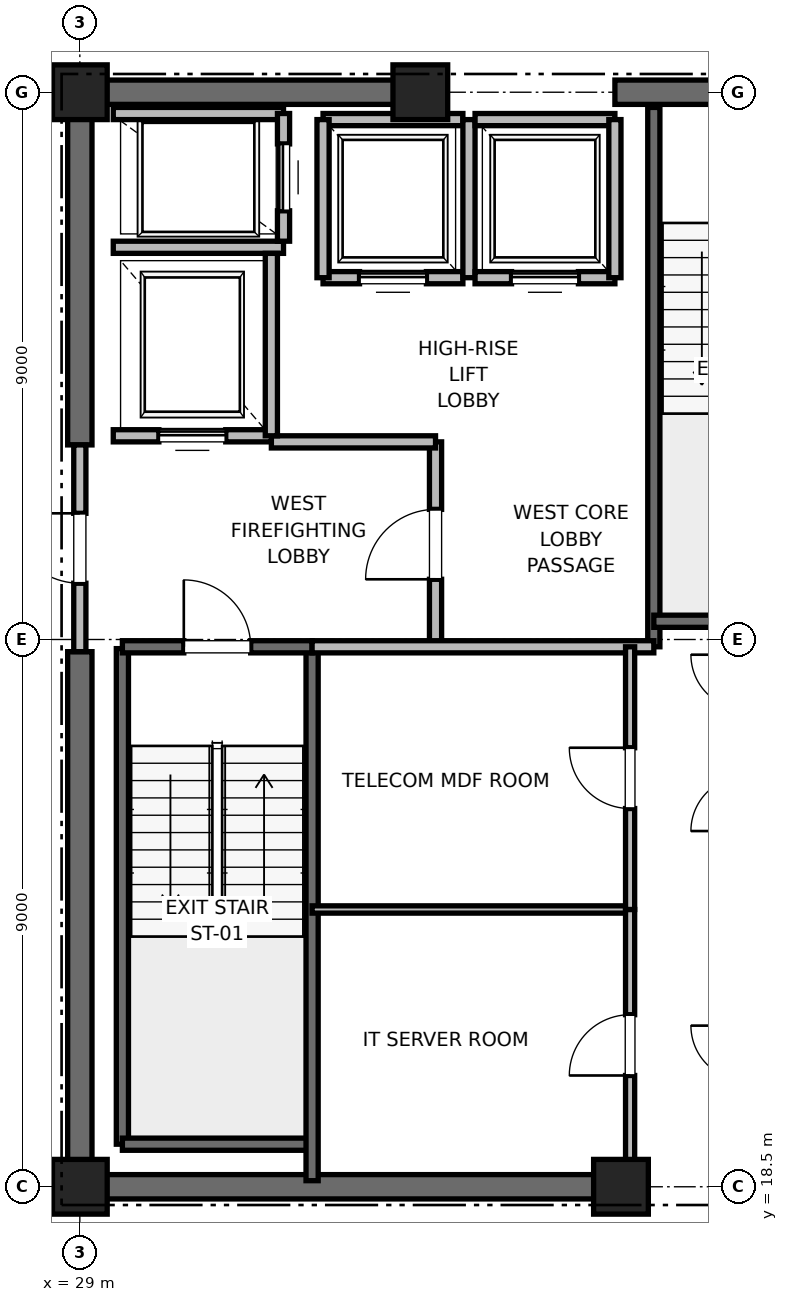
"""IFC4 building model, lengths in metres.
Left out: names, types, materials, properties, quantities, classifications, styles, units other than length and angle.
Written with IfcOpenShell. Run it as: python <this file> out.ifc"""

import sys

from ifc_helpers import new_model, si_unit, direction, frame, frame_2d, origin, origin_2d, place, context, subcontext, project, spatial, rectangle, extrude, element, fill, save


model = new_model("IFC4")
c1 = context("Model", 3, precision=1e-05, world=origin(), true_north=direction((0.0, 1.0)))
c2 = subcontext(c1, "Body", "Model", "MODEL_VIEW")
j1 = project(units=[si_unit("LENGTHUNIT", "METRE"), si_unit("PLANEANGLEUNIT", "RADIAN")], contexts=[c1])
p1 = place(None, origin())
s1 = spatial("IfcSite", under=j1, at=p1, CompositionType="ELEMENT")
p2 = place(p1, origin())
s2 = spatial("IfcBuilding", under=s1, at=p2, CompositionType="ELEMENT")
p3 = place(p2, frame((0.0, 0.0, 326.8)))
s3 = spatial("IfcBuildingStorey", under=s2, at=p3, CompositionType="ELEMENT", Elevation=326.8)
for number, where, z_axis, x_axis in (
    (1, (29.0, 18.5, 0.0), (0.0, 0.0, 1.0), (1.0, 0.0, 0.0)),
    (2, (29.0, 36.5, 0.0), (0.0, 0.0, 1.0), (1.0, 0.0, 0.0)),
    (3, (37.9, 18.5, 0.0), (0.0, 0.0, 1.0), (1.0, 0.0, 0.0)),
    (4, (34.6, 36.5, 0.0), (0.0, 0.0, 1.0), (1.0, 0.0, 0.0)),
):
    element("IfcColumn", number, at=place(p3, frame(where, z_axis=z_axis, x_axis=x_axis)), inside=s3, PredefinedType="PILASTER", context=c2, shape_type="SweptSolid", body=[
        extrude(rectangle(XDim=0.9, YDim=0.9, at=origin_2d()), origin(), (0.0, 0.0, 1.0), 4.0),
    ])
p4 = place(p3, frame((29.0, 18.5, 0.0), z_axis=(0.0, 0.0, 1.0), x_axis=(1.0, 0.0, 0.0)))
e5 = element("IfcWall", 5, at=p4, inside=s3, PredefinedType="SHEAR", context=c2, shape_type="SweptSolid", body=[
    extrude(rectangle(XDim=9.2, YDim=0.4, at=frame_2d((4.6, 0.0))), origin(), (0.0, 0.0, 1.0), 3.785),
])
p5 = place(p3, frame((29.0, 36.5, 0.0), z_axis=(0.0, 0.0, 1.0), x_axis=(1.0, 0.0, 0.0)))
e6 = element("IfcWall", 6, at=p5, inside=s3, PredefinedType="SHEAR", context=c2, shape_type="SweptSolid", body=[
    extrude(rectangle(XDim=5.8, YDim=0.4, at=frame_2d((2.9, 0.0))), origin(), (0.0, 0.0, 1.0), 3.785),
])
p6 = place(p3, frame((37.8, 36.5, 0.0), z_axis=(0.0, 0.0, 1.0), x_axis=(1.0, 0.0, 0.0)))
e7 = element("IfcWall", 7, at=p6, inside=s3, PredefinedType="SHEAR", context=c2, shape_type="SweptSolid", body=[
    extrude(rectangle(XDim=4.4, YDim=0.4, at=frame_2d((2.2, 0.0))), origin(), (0.0, 0.0, 1.0), 3.785),
])
p7 = place(p6, frame((1.65, 0.0, 0.0)))
e8 = element("IfcOpeningElement", 8, at=p7, cuts=e7, PredefinedType="OPENING", context=c2, shape_type="SweptSolid", body=[
    extrude(rectangle(XDim=1.1, YDim=2.15, at=frame_2d((0.55, 1.075))), frame((0.0, 0.2, 0.0), z_axis=(0.0, -1.0, 0.0), x_axis=(1.0, 0.0, 0.0)), (0.0, 0.0, 1.0), 0.4),
])
p8 = place(p3, frame((29.0, 18.5, 0.0), z_axis=(0.0, 0.0, 1.0), x_axis=(0.0, 1.0, 0.0)))
e9 = element("IfcWall", 9, at=p8, inside=s3, PredefinedType="SHEAR", context=c2, shape_type="SweptSolid", body=[
    extrude(rectangle(XDim=8.8, YDim=0.4, at=frame_2d((4.4, 0.0))), origin(), (0.0, 0.0, 1.0), 3.785),
])
p9 = place(p3, frame((29.0, 30.7, 0.0), z_axis=(0.0, 0.0, 1.0), x_axis=(0.0, 1.0, 0.0)))
e10 = element("IfcWall", 10, at=p9, inside=s3, PredefinedType="SHEAR", context=c2, shape_type="SweptSolid", body=[
    extrude(rectangle(XDim=5.8, YDim=0.4, at=frame_2d((2.9, 0.0))), origin(), (0.0, 0.0, 1.0), 3.785),
])
p10 = place(p3, frame((29.7, 19.2, 0.0), z_axis=(0.0, 0.0, 1.0), x_axis=(0.0, 1.0, 0.0)))
e11 = element("IfcWall", 11, at=p10, inside=s3, PredefinedType="SOLIDWALL", context=c2, shape_type="SweptSolid", body=[
    extrude(rectangle(XDim=8.15, YDim=0.2, at=frame_2d((4.075, 0.0))), origin(), (0.0, 0.0, 1.0), 3.785),
])
p11 = place(p3, frame((29.7, 19.2, 0.0), z_axis=(0.0, 0.0, 1.0), x_axis=(1.0, 0.0, 0.0)))
e12 = element("IfcWall", 12, at=p11, inside=s3, PredefinedType="SOLIDWALL", context=c2, shape_type="SweptSolid", body=[
    extrude(rectangle(XDim=3.12, YDim=0.2, at=frame_2d((1.56, 0.0))), origin(), (0.0, 0.0, 1.0), 3.785),
])
p12 = place(p3, frame((32.82, 18.6, 0.0), z_axis=(0.0, 0.0, 1.0), x_axis=(0.0, 1.0, 0.0)))
e13 = element("IfcWall", 13, at=p12, inside=s3, PredefinedType="SOLIDWALL", context=c2, shape_type="SweptSolid", body=[
    extrude(rectangle(XDim=8.78, YDim=0.2, at=frame_2d((4.39, 0.0))), origin(), (0.0, 0.0, 1.0), 3.785),
])
p13 = place(p3, frame((29.7, 27.38, 0.0), z_axis=(0.0, 0.0, 1.0), x_axis=(1.0, 0.0, 0.0)))
e14 = element("IfcWall", 14, at=p13, inside=s3, PredefinedType="SOLIDWALL", context=c2, shape_type="SweptSolid", body=[
    extrude(rectangle(XDim=3.12, YDim=0.2, at=frame_2d((1.56, 0.0))), origin(), (0.0, 0.0, 1.0), 3.785),
])
p14 = place(p13, frame((1.01, 0.0, 0.0)))
e15 = element("IfcOpeningElement", 15, at=p14, cuts=e14, PredefinedType="OPENING", context=c2, shape_type="SweptSolid", body=[
    extrude(rectangle(XDim=1.1, YDim=2.15, at=frame_2d((0.55, 1.075))), frame((0.0, 0.1, 0.0), z_axis=(0.0, -1.0, 0.0), x_axis=(1.0, 0.0, 0.0)), (0.0, 0.0, 1.0), 0.2),
])
p15 = place(p3, frame((38.44, 27.38, 0.0), z_axis=(0.0, 0.0, 1.0), x_axis=(0.0, 1.0, 0.0)))
e16 = element("IfcWall", 16, at=p15, inside=s3, PredefinedType="SOLIDWALL", context=c2, shape_type="SweptSolid", body=[
    extrude(rectangle(XDim=8.87, YDim=0.2, at=frame_2d((4.435, 0.0))), origin(), (0.0, 0.0, 1.0), 3.785),
])
p16 = place(p3, frame((38.44, 27.8, 0.0), z_axis=(0.0, 0.0, 1.0), x_axis=(1.0, 0.0, 0.0)))
e17 = element("IfcWall", 17, at=p16, inside=s3, PredefinedType="SOLIDWALL", context=c2, shape_type="SweptSolid", body=[
    extrude(rectangle(XDim=3.32, YDim=0.2, at=frame_2d((1.66, 0.0))), origin(), (0.0, 0.0, 1.0), 3.785),
])
p17 = place(p3, frame((34.85, 27.38, 0.0), z_axis=(0.0, 0.0, 1.0), x_axis=(0.0, 1.0, 0.0)))
e18 = element("IfcWall", 18, at=p17, inside=s3, PredefinedType="PARTITIONING", context=c2, shape_type="SweptSolid", body=[
    extrude(rectangle(XDim=3.37, YDim=0.2, at=frame_2d((1.685, 0.0))), origin(), (0.0, 0.0, 1.0), 3.785),
])
p18 = place(p17, frame((1.11, 0.0, 0.0)))
e19 = element("IfcOpeningElement", 19, at=p18, cuts=e18, PredefinedType="OPENING", context=c2, shape_type="SweptSolid", body=[
    extrude(rectangle(XDim=1.15, YDim=2.2, at=frame_2d((0.575, 1.1))), frame((0.0, 0.1, 0.0), z_axis=(0.0, -1.0, 0.0), x_axis=(1.0, 0.0, 0.0)), (0.0, 0.0, 1.0), 0.2),
])
p19 = place(p3, frame((29.0, 27.3, 0.0), z_axis=(0.0, 0.0, 1.0), x_axis=(0.0, 1.0, 0.0)))
e20 = element("IfcWall", 20, at=p19, inside=s3, PredefinedType="PARTITIONING", context=c2, shape_type="SweptSolid", body=[
    extrude(rectangle(XDim=3.4, YDim=0.2, at=frame_2d((1.7, 0.0))), origin(), (0.0, 0.0, 1.0), 2.865),
])
p20 = place(p19, frame((1.125, 0.0, 0.0)))
e21 = element("IfcOpeningElement", 21, at=p20, cuts=e20, PredefinedType="OPENING", context=c2, shape_type="SweptSolid", body=[
    extrude(rectangle(XDim=1.15, YDim=2.2, at=frame_2d((0.575, 1.1))), frame((0.0, 0.1, 0.0), z_axis=(0.0, -1.0, 0.0), x_axis=(1.0, 0.0, 0.0)), (0.0, 0.0, 1.0), 0.2),
])
p21 = place(p3, frame((32.82, 27.38, 0.0), z_axis=(0.0, 0.0, 1.0), x_axis=(1.0, 0.0, 0.0)))
e22 = element("IfcWall", 22, at=p21, inside=s3, PredefinedType="PARTITIONING", context=c2, shape_type="SweptSolid", body=[
    extrude(rectangle(XDim=5.62, YDim=0.2, at=frame_2d((2.81, 0.0))), origin(), (0.0, 0.0, 1.0), 3.785),
])
p22 = place(p3, frame((32.15, 30.75, 0.0), z_axis=(0.0, 0.0, 1.0), x_axis=(1.0, 0.0, 0.0)))
e23 = element("IfcWall", 23, at=p22, inside=s3, PredefinedType="PARTITIONING", context=c2, shape_type="SweptSolid", body=[
    extrude(rectangle(XDim=2.7, YDim=0.2, at=frame_2d((1.35, 0.0))), origin(), (0.0, 0.0, 1.0), 3.785),
])
p23 = place(p3, frame((29.55, 30.85, 0.0), z_axis=(0.0, 0.0, 1.0), x_axis=(1.0, 0.0, 0.0)))
e24 = element("IfcWall", 24, at=p23, inside=s3, PredefinedType="SOLIDWALL", context=c2, shape_type="SweptSolid", body=[
    extrude(rectangle(XDim=2.6, YDim=0.2, at=frame_2d((1.3, 0.0))), origin(), (0.0, 0.0, 1.0), 2.865),
])
p24 = place(p23, frame((0.75, 0.0, 0.0)))
e25 = element("IfcOpeningElement", 25, at=p24, cuts=e24, PredefinedType="OPENING", context=c2, shape_type="SweptSolid", body=[
    extrude(rectangle(XDim=1.1, YDim=2.2, at=frame_2d((0.55, 1.1))), frame((0.0, 0.1, 0.0), z_axis=(0.0, -1.0, 0.0), x_axis=(1.0, 0.0, 0.0)), (0.0, 0.0, 1.0), 0.2),
])
p25 = place(p3, frame((29.55, 33.95, 0.0), z_axis=(0.0, 0.0, 1.0), x_axis=(1.0, 0.0, 0.0)))
e26 = element("IfcWall", 26, at=p25, inside=s3, PredefinedType="SOLIDWALL", context=c2, shape_type="SweptSolid", body=[
    extrude(rectangle(XDim=2.8, YDim=0.2, at=frame_2d((1.4, 0.0))), origin(), (0.0, 0.0, 1.0), 3.785),
])
p26 = place(p3, frame((32.15, 30.85, 0.0), z_axis=(0.0, 0.0, 1.0), x_axis=(0.0, 1.0, 0.0)))
e27 = element("IfcWall", 27, at=p26, inside=s3, PredefinedType="SOLIDWALL", context=c2, shape_type="SweptSolid", body=[
    extrude(rectangle(XDim=3.0, YDim=0.2, at=frame_2d((1.5, 0.0))), origin(), (0.0, 0.0, 1.0), 3.785),
])
p27 = place(p3, frame((32.35, 36.15, 0.0), z_axis=(0.0, 0.0, 1.0), x_axis=(-1.0, 0.0, 0.0)))
e28 = element("IfcWall", 28, at=p27, inside=s3, PredefinedType="SOLIDWALL", context=c2, shape_type="SweptSolid", body=[
    extrude(rectangle(XDim=2.8, YDim=0.2, at=frame_2d((1.4, 0.0))), origin(), (0.0, 0.0, 1.0), 3.22),
])
p28 = place(p3, frame((32.35, 34.05, 0.0), z_axis=(0.0, 0.0, 1.0), x_axis=(0.0, 1.0, 0.0)))
e29 = element("IfcWall", 29, at=p28, inside=s3, PredefinedType="SOLIDWALL", context=c2, shape_type="SweptSolid", body=[
    extrude(rectangle(XDim=2.1, YDim=0.2, at=frame_2d((1.05, 0.0))), origin(), (0.0, 0.0, 1.0), 3.785),
])
p29 = place(p28, frame((0.5, 0.0, 0.0)))
e30 = element("IfcOpeningElement", 30, at=p29, cuts=e29, PredefinedType="OPENING", context=c2, shape_type="SweptSolid", body=[
    extrude(rectangle(XDim=1.1, YDim=2.2, at=frame_2d((0.55, 1.1))), frame((0.0, 0.1, 0.0), z_axis=(0.0, -1.0, 0.0), x_axis=(1.0, 0.0, 0.0)), (0.0, 0.0, 1.0), 0.2),
])
p30 = place(p3, frame((33.0, 33.45, 0.0), z_axis=(0.0, 0.0, 1.0), x_axis=(1.0, 0.0, 0.0)))
e31 = element("IfcWall", 31, at=p30, inside=s3, PredefinedType="SOLIDWALL", context=c2, shape_type="SweptSolid", body=[
    extrude(rectangle(XDim=2.3, YDim=0.2, at=frame_2d((1.15, 0.0))), origin(), (0.0, 0.0, 1.0), 3.785),
])
p31 = place(p30, frame((0.6, 0.0, 0.0)))
e32 = element("IfcOpeningElement", 32, at=p31, cuts=e31, PredefinedType="OPENING", context=c2, shape_type="SweptSolid", body=[
    extrude(rectangle(XDim=1.1, YDim=2.2, at=frame_2d((0.55, 1.1))), frame((0.0, 0.1, 0.0), z_axis=(0.0, -1.0, 0.0), x_axis=(1.0, 0.0, 0.0)), (0.0, 0.0, 1.0), 0.2),
])
p32 = place(p3, frame((35.3, 36.05, 0.0), z_axis=(0.0, 0.0, 1.0), x_axis=(-1.0, 0.0, 0.0)))
e33 = element("IfcWall", 33, at=p32, inside=s3, PredefinedType="SOLIDWALL", context=c2, shape_type="SweptSolid", body=[
    extrude(rectangle(XDim=2.3, YDim=0.2, at=frame_2d((1.15, 0.0))), origin(), (0.0, 0.0, 1.0), 2.865),
])
p33 = place(p3, frame((33.0, 36.05, 0.0), z_axis=(0.0, 0.0, 1.0), x_axis=(0.0, -1.0, 0.0)))
e34 = element("IfcWall", 34, at=p33, inside=s3, PredefinedType="SOLIDWALL", context=c2, shape_type="SweptSolid", body=[
    extrude(rectangle(XDim=2.6, YDim=0.2, at=frame_2d((1.3, 0.0))), origin(), (0.0, 0.0, 1.0), 3.785),
])
p34 = place(p3, frame((35.4, 33.45, 0.0), z_axis=(0.0, 0.0, 1.0), x_axis=(0.0, 1.0, 0.0)))
e35 = element("IfcWall", 35, at=p34, inside=s3, PredefinedType="SOLIDWALL", context=c2, shape_type="SweptSolid", body=[
    extrude(rectangle(XDim=2.6, YDim=0.2, at=frame_2d((1.3, 0.0))), origin(), (0.0, 0.0, 1.0), 2.865),
])
p35 = place(p3, frame((35.5, 33.45, 0.0), z_axis=(0.0, 0.0, 1.0), x_axis=(1.0, 0.0, 0.0)))
e36 = element("IfcWall", 36, at=p35, inside=s3, PredefinedType="SOLIDWALL", context=c2, shape_type="SweptSolid", body=[
    extrude(rectangle(XDim=2.3, YDim=0.2, at=frame_2d((1.15, 0.0))), origin(), (0.0, 0.0, 1.0), 3.785),
])
p36 = place(p35, frame((0.6, 0.0, 0.0)))
e37 = element("IfcOpeningElement", 37, at=p36, cuts=e36, PredefinedType="OPENING", context=c2, shape_type="SweptSolid", body=[
    extrude(rectangle(XDim=1.1, YDim=2.2, at=frame_2d((0.55, 1.1))), frame((0.0, 0.1, 0.0), z_axis=(0.0, -1.0, 0.0), x_axis=(1.0, 0.0, 0.0)), (0.0, 0.0, 1.0), 0.2),
])
p37 = place(p3, frame((37.8, 36.05, 0.0), z_axis=(0.0, 0.0, 1.0), x_axis=(-1.0, 0.0, 0.0)))
e38 = element("IfcWall", 38, at=p37, inside=s3, PredefinedType="SOLIDWALL", context=c2, shape_type="SweptSolid", body=[
    extrude(rectangle(XDim=2.3, YDim=0.2, at=frame_2d((1.15, 0.0))), origin(), (0.0, 0.0, 1.0), 2.865),
])
p38 = place(p3, frame((37.8, 33.45, 0.0), z_axis=(0.0, 0.0, 1.0), x_axis=(0.0, 1.0, 0.0)))
e39 = element("IfcWall", 39, at=p38, inside=s3, PredefinedType="SOLIDWALL", context=c2, shape_type="SweptSolid", body=[
    extrude(rectangle(XDim=2.6, YDim=0.2, at=frame_2d((1.3, 0.0))), origin(), (0.0, 0.0, 1.0), 2.865),
])
p39 = place(p3, frame((32.82, 23.06, 0.0), z_axis=(0.0, 0.0, 1.0), x_axis=(1.0, 0.0, 0.0)))
e40 = element("IfcWall", 40, at=p39, inside=s3, PredefinedType="PARTITIONING", context=c2, shape_type="SweptSolid", body=[
    extrude(rectangle(XDim=5.23, YDim=0.12, at=frame_2d((2.615, 0.0))), origin(), (0.0, 0.0, 1.0), 2.85),
])
p40 = place(p3, frame((38.05, 18.6, 0.0), z_axis=(0.0, 0.0, 1.0), x_axis=(0.0, 1.0, 0.0)))
e41 = element("IfcWall", 41, at=p40, inside=s3, PredefinedType="PARTITIONING", context=c2, shape_type="SweptSolid", body=[
    extrude(rectangle(XDim=4.46, YDim=0.15, at=frame_2d((2.23, 0.0))), origin(), (0.0, 0.0, 1.0), 2.85),
])
p41 = place(p40, frame((1.73, 0.0, 0.0)))
e42 = element("IfcOpeningElement", 42, at=p41, cuts=e41, PredefinedType="OPENING", context=c2, shape_type="SweptSolid", body=[
    extrude(rectangle(XDim=1.0, YDim=2.15, at=frame_2d((0.5, 1.075))), frame((0.0, 0.075, 0.0), z_axis=(0.0, -1.0, 0.0), x_axis=(1.0, 0.0, 0.0)), (0.0, 0.0, 1.0), 0.15),
])
p42 = place(p3, frame((38.05, 23.06, 0.0), z_axis=(0.0, 0.0, 1.0), x_axis=(0.0, 1.0, 0.0)))
e43 = element("IfcWall", 43, at=p42, inside=s3, PredefinedType="PARTITIONING", context=c2, shape_type="SweptSolid", body=[
    extrude(rectangle(XDim=4.32, YDim=0.15, at=frame_2d((2.16, 0.0))), origin(), (0.0, 0.0, 1.0), 2.85),
])
p43 = place(p42, frame((1.66, 0.0, 0.0)))
e44 = element("IfcOpeningElement", 44, at=p43, cuts=e43, PredefinedType="OPENING", context=c2, shape_type="SweptSolid", body=[
    extrude(rectangle(XDim=1.0, YDim=2.15, at=frame_2d((0.5, 1.075))), frame((0.0, 0.075, 0.0), z_axis=(0.0, -1.0, 0.0), x_axis=(1.0, 0.0, 0.0)), (0.0, 0.0, 1.0), 0.15),
])
p44 = place(p14, origin())
e45 = element("IfcDoor", 45, at=p44, inside=s3, OperationType="SINGLE_SWING_LEFT", PredefinedType="DOOR", context=c2, shape_type="SweptSolid", body=[
    extrude(rectangle(XDim=1.1, YDim=2.15, at=frame_2d((0.55, 1.075))), frame((0.0, 0.025, 0.0), z_axis=(0.0, -1.0, 0.0), x_axis=(1.0, 0.0, 0.0)), (0.0, 0.0, 1.0), 0.05),
])
fill(e15, e45)
p45 = place(p18, origin())
e46 = element("IfcDoor", 46, at=p45, inside=s3, OperationType="SINGLE_SWING_LEFT", PredefinedType="DOOR", context=c2, shape_type="SweptSolid", body=[
    extrude(rectangle(XDim=1.15, YDim=2.2, at=frame_2d((0.575, 1.1))), frame((0.0, 0.025, 0.0), z_axis=(0.0, -1.0, 0.0), x_axis=(1.0, 0.0, 0.0)), (0.0, 0.0, 1.0), 0.05),
])
fill(e19, e46)
p46 = place(p20, origin())
e47 = element("IfcDoor", 47, at=p46, inside=s3, OperationType="SINGLE_SWING_RIGHT", PredefinedType="DOOR", context=c2, shape_type="SweptSolid", body=[
    extrude(rectangle(XDim=1.15, YDim=2.2, at=frame_2d((0.575, 1.1))), frame((0.0, 0.025, 0.0), z_axis=(0.0, -1.0, 0.0), x_axis=(1.0, 0.0, 0.0)), (0.0, 0.0, 1.0), 0.05),
])
fill(e21, e47)
p47 = place(p24, origin())
e48 = element("IfcDoor", 48, at=p47, inside=s3, OperationType="SLIDING_TO_RIGHT", PredefinedType="DOOR", context=c2, shape_type="SweptSolid", body=[
    extrude(rectangle(XDim=1.1, YDim=2.2, at=frame_2d((0.55, 1.1))), frame((0.0, 0.025, 0.0), z_axis=(0.0, -1.0, 0.0), x_axis=(1.0, 0.0, 0.0)), (0.0, 0.0, 1.0), 0.05),
])
fill(e25, e48)
p48 = place(p29, origin())
e49 = element("IfcDoor", 49, at=p48, inside=s3, OperationType="SLIDING_TO_RIGHT", PredefinedType="DOOR", context=c2, shape_type="SweptSolid", body=[
    extrude(rectangle(XDim=1.1, YDim=2.2, at=frame_2d((0.55, 1.1))), frame((0.0, 0.025, 0.0), z_axis=(0.0, -1.0, 0.0), x_axis=(1.0, 0.0, 0.0)), (0.0, 0.0, 1.0), 0.05),
])
fill(e30, e49)
p49 = place(p31, origin())
e50 = element("IfcDoor", 50, at=p49, inside=s3, OperationType="SLIDING_TO_RIGHT", PredefinedType="DOOR", context=c2, shape_type="SweptSolid", body=[
    extrude(rectangle(XDim=1.1, YDim=2.2, at=frame_2d((0.55, 1.1))), frame((0.0, 0.025, 0.0), z_axis=(0.0, -1.0, 0.0), x_axis=(1.0, 0.0, 0.0)), (0.0, 0.0, 1.0), 0.05),
])
fill(e32, e50)
p50 = place(p36, origin())
e51 = element("IfcDoor", 51, at=p50, inside=s3, OperationType="SLIDING_TO_RIGHT", PredefinedType="DOOR", context=c2, shape_type="SweptSolid", body=[
    extrude(rectangle(XDim=1.1, YDim=2.2, at=frame_2d((0.55, 1.1))), frame((0.0, 0.025, 0.0), z_axis=(0.0, -1.0, 0.0), x_axis=(1.0, 0.0, 0.0)), (0.0, 0.0, 1.0), 0.05),
])
fill(e37, e51)
p51 = place(p41, origin())
e52 = element("IfcDoor", 52, at=p51, inside=s3, OperationType="SINGLE_SWING_LEFT", PredefinedType="DOOR", context=c2, shape_type="SweptSolid", body=[
    extrude(rectangle(XDim=1.0, YDim=2.15, at=frame_2d((0.5, 1.075))), frame((0.0, 0.025, 0.0), z_axis=(0.0, -1.0, 0.0), x_axis=(1.0, 0.0, 0.0)), (0.0, 0.0, 1.0), 0.05),
])
fill(e42, e52)
p52 = place(p43, origin())
e53 = element("IfcDoor", 53, at=p52, inside=s3, OperationType="SINGLE_SWING_RIGHT", PredefinedType="DOOR", context=c2, shape_type="SweptSolid", body=[
    extrude(rectangle(XDim=1.0, YDim=2.15, at=frame_2d((0.5, 1.075))), frame((0.0, 0.025, 0.0), z_axis=(0.0, -1.0, 0.0), x_axis=(1.0, 0.0, 0.0)), (0.0, 0.0, 1.0), 0.05),
])
fill(e44, e53)
save(model, sys.argv[1])
